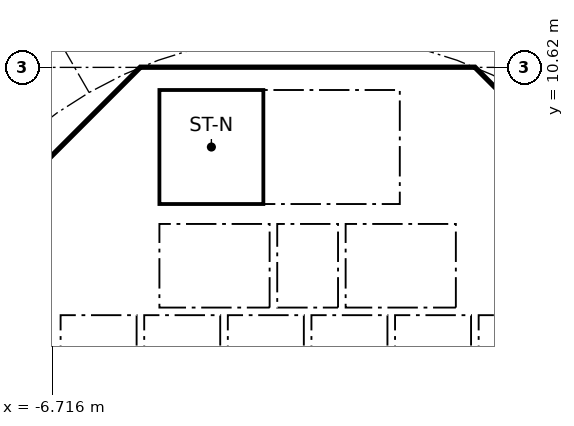
"""IFC4 building model, lengths in metres.
Left out: names, types, materials, properties, quantities, classifications, styles, units other than length and angle.
Written with IfcOpenShell. Run it as: python <this file> out.ifc"""

import sys

from ifc_helpers import new_model, si_unit, direction, frame, frame_2d, origin, place, context, subcontext, project, spatial, polyline, rectangle, outline, extrude, element, fill, save


model = new_model("IFC4")
c1 = context("Model", 3, precision=1e-05, world=origin(), true_north=direction((0.0, 1.0)))
c2 = subcontext(c1, "Body", "Model", "MODEL_VIEW")
j1 = project(units=[si_unit("LENGTHUNIT", "METRE"), si_unit("PLANEANGLEUNIT", "RADIAN")], contexts=[c1])
p1 = place(None, origin())
s1 = spatial("IfcSite", under=j1, at=p1, CompositionType="ELEMENT")
p2 = place(p1, origin())
s2 = spatial("IfcBuilding", under=s1, at=p2, CompositionType="ELEMENT")
p3 = place(p2, frame((0.0, 0.0, 7.0)))
s3 = spatial("IfcBuildingStorey", under=s2, at=p3, CompositionType="ELEMENT", Elevation=7.0)
p4 = place(p3, frame((9.988, 4.613, 0.0), z_axis=(0.0, 0.0, 1.0), x_axis=(-0.707106781187, 0.707106781187, 0.0)))
e1 = element("IfcWall", 1, at=p4, inside=s3, PredefinedType="SHEAR", context=c2, shape_type="SweptSolid", body=[
    extrude(rectangle(XDim=7.602, YDim=0.6, at=frame_2d((3.801, 0.0))), origin(), (0.0, 0.0, 1.0), 4.7),
])
p5 = place(p4, frame((3.201, 0.0, 0.0)))
e2 = element("IfcOpeningElement", 2, at=p5, cuts=e1, PredefinedType="OPENING", context=c2, shape_type="SweptSolid", body=[
    extrude(rectangle(XDim=1.2, YDim=2.1, at=frame_2d((0.6, 1.05))), frame((0.0, 0.31, 0.0), z_axis=(0.0, -1.0, 0.0), x_axis=(1.0, 0.0, 0.0)), (0.0, 0.0, 1.0), 0.62),
])
p6 = place(p3, frame((-4.613, 9.988, 0.0), z_axis=(0.0, 0.0, 1.0), x_axis=(-0.707106781187, -0.707106781187, 0.0)))
e3 = element("IfcWall", 3, at=p6, inside=s3, PredefinedType="SHEAR", context=c2, shape_type="SweptSolid", body=[
    extrude(rectangle(XDim=7.602, YDim=0.6, at=frame_2d((3.801, 0.0))), origin(), (0.0, 0.0, 1.0), 4.7),
])
p7 = place(p6, frame((0.351, 0.0, 0.0)))
e4 = element("IfcOpeningElement", 4, at=p7, cuts=e3, PredefinedType="OPENING", context=c2, shape_type="SweptSolid", body=[
    extrude(rectangle(XDim=1.1, YDim=2.1, at=frame_2d((0.55, 1.05))), frame((0.0, 0.31, 0.0), z_axis=(0.0, -1.0, 0.0), x_axis=(1.0, 0.0, 0.0)), (0.0, 0.0, 1.0), 0.62),
])
p8 = place(p3, frame((-5.8, 4.3, 0.0), z_axis=(0.0, 0.0, 1.0), x_axis=(0.0, 1.0, 0.0)))
e5 = element("IfcWall", 5, at=p8, inside=s3, PredefinedType="PARTITIONING", context=c2, shape_type="SweptSolid", body=[
    extrude(rectangle(XDim=3.927, YDim=0.15, at=frame_2d((1.963, 0.0))), origin(), (0.0, 0.0, 1.0), 4.7),
])
p9 = place(p8, frame((1.551, 0.0, 0.0)))
e6 = element("IfcOpeningElement", 6, at=p9, cuts=e5, PredefinedType="OPENING", context=c2, shape_type="SweptSolid", body=[
    extrude(rectangle(XDim=0.9, YDim=2.1, at=frame_2d((0.45, 1.05))), frame((0.0, 0.085, 0.0), z_axis=(0.0, -1.0, 0.0), x_axis=(1.0, 0.0, 0.0)), (0.0, 0.0, 1.0), 0.17),
])
p10 = place(p3, frame((4.0, 4.3, 0.0), z_axis=(0.0, 0.0, 1.0), x_axis=(0.0, 1.0, 0.0)))
e7 = element("IfcWall", 7, at=p10, inside=s3, PredefinedType="SOLIDWALL", context=c2, shape_type="SweptSolid", body=[
    extrude(rectangle(XDim=2.2, YDim=0.2, at=frame_2d((1.1, 0.0))), origin(), (0.0, 0.0, 1.0), 4.7),
])
p11 = place(p10, frame((0.55, 0.0, 0.0)))
e8 = element("IfcOpeningElement", 8, at=p11, cuts=e7, PredefinedType="OPENING", context=c2, shape_type="SweptSolid", body=[
    extrude(rectangle(XDim=1.1, YDim=2.1, at=frame_2d((0.55, 1.05))), frame((0.0, 0.11, 0.0), z_axis=(0.0, -1.0, 0.0), x_axis=(1.0, 0.0, 0.0)), (0.0, 0.0, 1.0), 0.22),
])
p12 = place(p3, frame((-4.0, 4.3, 0.0), z_axis=(0.0, 0.0, 1.0), x_axis=(0.0, 1.0, 0.0)))
e9 = element("IfcWall", 9, at=p12, inside=s3, PredefinedType="SOLIDWALL", context=c2, shape_type="SweptSolid", body=[
    extrude(rectangle(XDim=2.2, YDim=0.2, at=frame_2d((1.1, 0.0))), origin(), (0.0, 0.0, 1.0), 4.7),
])
p13 = place(p12, frame((0.55, 0.0, 0.0)))
e10 = element("IfcOpeningElement", 10, at=p13, cuts=e9, PredefinedType="OPENING", context=c2, shape_type="SweptSolid", body=[
    extrude(rectangle(XDim=1.1, YDim=2.1, at=frame_2d((0.55, 1.05))), frame((0.0, 0.11, 0.0), z_axis=(0.0, -1.0, 0.0), x_axis=(1.0, 0.0, 0.0)), (0.0, 0.0, 1.0), 0.22),
])
p14 = place(p3, frame((4.0, 7.025, 0.0), z_axis=(0.0, 0.0, 1.0), x_axis=(0.0, 1.0, 0.0)))
e11 = element("IfcWall", 11, at=p14, inside=s3, PredefinedType="SOLIDWALL", context=c2, shape_type="SweptSolid", body=[
    extrude(rectangle(XDim=3.0, YDim=0.2, at=frame_2d((1.5, 0.0))), origin(), (0.0, 0.0, 1.0), 4.7),
])
p15 = place(p14, frame((0.925, 0.0, 0.0)))
e12 = element("IfcOpeningElement", 12, at=p15, cuts=e11, PredefinedType="OPENING", context=c2, shape_type="SweptSolid", body=[
    extrude(rectangle(XDim=1.1, YDim=2.1, at=frame_2d((0.55, 1.05))), frame((0.0, 0.11, 0.0), z_axis=(0.0, -1.0, 0.0), x_axis=(1.0, 0.0, 0.0)), (0.0, 0.0, 1.0), 0.22),
])
p16 = place(p3, origin())
e13 = element("IfcWall", 13, at=p16, inside=s3, PredefinedType="SHEAR", context=c2, shape_type="SweptSolid", body=[
    extrude(outline(polyline([(-4.152, 10.025), (-4.401, 9.776), (-4.825, 10.2), (-4.401, 10.625), (4.401, 10.625), (4.825, 10.2), (4.401, 9.776), (4.152, 10.025), (-4.152, 10.025)])), origin(), (0.0, 0.0, 1.0), 4.7),
])
for number, where, z_axis, x_axis in (
    (14, (-0.9, 4.3, 0.0), (0.0, 0.0, 1.0), (0.0, 1.0, 0.0)),
    (15, (0.9, 4.3, 0.0), (0.0, 0.0, 1.0), (0.0, 1.0, 0.0)),
):
    element("IfcWall", number, at=place(p3, frame(where, z_axis=z_axis, x_axis=x_axis)), inside=s3, PredefinedType="SOLIDWALL", context=c2, shape_type="SweptSolid", body=[
        extrude(rectangle(XDim=2.2, YDim=0.2, at=frame_2d((1.1, 0.0))), origin(), (0.0, 0.0, 1.0), 4.7),
    ])
p17 = place(p3, origin())
e16 = element("IfcWall", 16, at=p17, inside=s3, PredefinedType="SOLIDWALL", context=c2, shape_type="SweptSolid", body=[
    extrude(outline(polyline([(-6.5, 2.1), (-6.7, 2.1), (-6.7, 4.3), (6.7, 4.3), (6.7, 2.1), (6.5, 2.1), (6.5, 4.1), (4.5, 4.1), (4.5, 2.1), (4.3, 2.1), (4.3, 4.1), (2.3, 4.1), (2.3, 2.1), (2.1, 2.1), (2.1, 4.1), (0.1, 4.1), (0.1, 2.1), (-0.1, 2.1), (-0.1, 4.1), (-2.1, 4.1), (-2.1, 2.1), (-2.3, 2.1), (-2.3, 4.1), (-4.3, 4.1), (-4.3, 2.1), (-4.5, 2.1), (-4.5, 4.1), (-6.5, 4.1), (-6.5, 2.1)])), origin(), (0.0, 0.0, 1.0), 4.7),
])
p18 = place(p3, frame((-10.025, 4.0, 0.0), z_axis=(0.0, 0.0, 1.0), x_axis=(1.0, 0.0, 0.0)))
e17 = element("IfcWall", 17, at=p18, inside=s3, PredefinedType="PARTITIONING", context=c2, shape_type="SweptSolid", body=[
    extrude(rectangle(XDim=3.325, YDim=0.2, at=frame_2d((1.662, 0.0))), origin(), (0.0, 0.0, 1.0), 4.7),
])
p19 = place(p3, origin())
e18 = element("IfcWall", 18, at=p19, inside=s3, PredefinedType="SOLIDWALL", context=c2, shape_type="SweptSolid", body=[
    extrude(outline(polyline([(-3.9, 7.025), (-4.1, 7.025), (-4.1, 10.025), (-3.9, 10.025), (-3.9, 7.025)])), origin(), (0.0, 0.0, 1.0), 4.7),
])
p20 = place(p3, origin())
e19 = element("IfcWall", 19, at=p20, inside=s3, PredefinedType="SOLIDWALL", context=c2, shape_type="SweptSolid", body=[
    extrude(outline(polyline([(4.1, 6.5), (-4.1, 6.5), (-4.1, 7.025), (4.1, 7.025), (4.1, 6.5)])), origin(), (0.0, 0.0, 1.0), 4.7),
])
p21 = place(p11, origin())
e20 = element("IfcDoor", 20, at=p21, inside=s3, OperationType="DOUBLE_DOOR_SLIDING", PredefinedType="DOOR", context=c2, shape_type="SweptSolid", body=[
    extrude(rectangle(XDim=1.1, YDim=2.1, at=frame_2d((0.55, 1.05))), frame((0.0, 0.025, 0.0), z_axis=(0.0, -1.0, 0.0), x_axis=(1.0, 0.0, 0.0)), (0.0, 0.0, 1.0), 0.05),
])
fill(e8, e20)
p22 = place(p13, origin())
e21 = element("IfcDoor", 21, at=p22, inside=s3, OperationType="DOUBLE_DOOR_SLIDING", PredefinedType="DOOR", context=c2, shape_type="SweptSolid", body=[
    extrude(rectangle(XDim=1.1, YDim=2.1, at=frame_2d((0.55, 1.05))), frame((0.0, 0.025, 0.0), z_axis=(0.0, -1.0, 0.0), x_axis=(1.0, 0.0, 0.0)), (0.0, 0.0, 1.0), 0.05),
])
fill(e10, e21)
p23 = place(p15, origin())
e22 = element("IfcDoor", 22, at=p23, inside=s3, OperationType="SINGLE_SWING_RIGHT", PredefinedType="DOOR", context=c2, shape_type="SweptSolid", body=[
    extrude(rectangle(XDim=1.1, YDim=2.1, at=frame_2d((0.55, 1.05))), frame((0.0, 0.025, 0.0), z_axis=(0.0, -1.0, 0.0), x_axis=(1.0, 0.0, 0.0)), (0.0, 0.0, 1.0), 0.05),
])
fill(e12, e22)
p24 = place(p9, origin())
e23 = element("IfcDoor", 23, at=p24, inside=s3, OperationType="SINGLE_SWING_LEFT", PredefinedType="DOOR", context=c2, shape_type="SweptSolid", body=[
    extrude(rectangle(XDim=0.9, YDim=2.1, at=frame_2d((0.45, 1.05))), frame((0.0, 0.025, 0.0), z_axis=(0.0, -1.0, 0.0), x_axis=(1.0, 0.0, 0.0)), (0.0, 0.0, 1.0), 0.05),
])
fill(e6, e23)
p25 = place(p7, origin())
e24 = element("IfcDoor", 24, at=p25, inside=s3, OperationType="SINGLE_SWING_LEFT", PredefinedType="DOOR", context=c2, shape_type="SweptSolid", body=[
    extrude(rectangle(XDim=1.1, YDim=2.1, at=frame_2d((0.55, 1.05))), frame((0.0, 0.025, 0.0), z_axis=(0.0, -1.0, 0.0), x_axis=(1.0, 0.0, 0.0)), (0.0, 0.0, 1.0), 0.05),
])
fill(e4, e24)
save(model, sys.argv[1])
